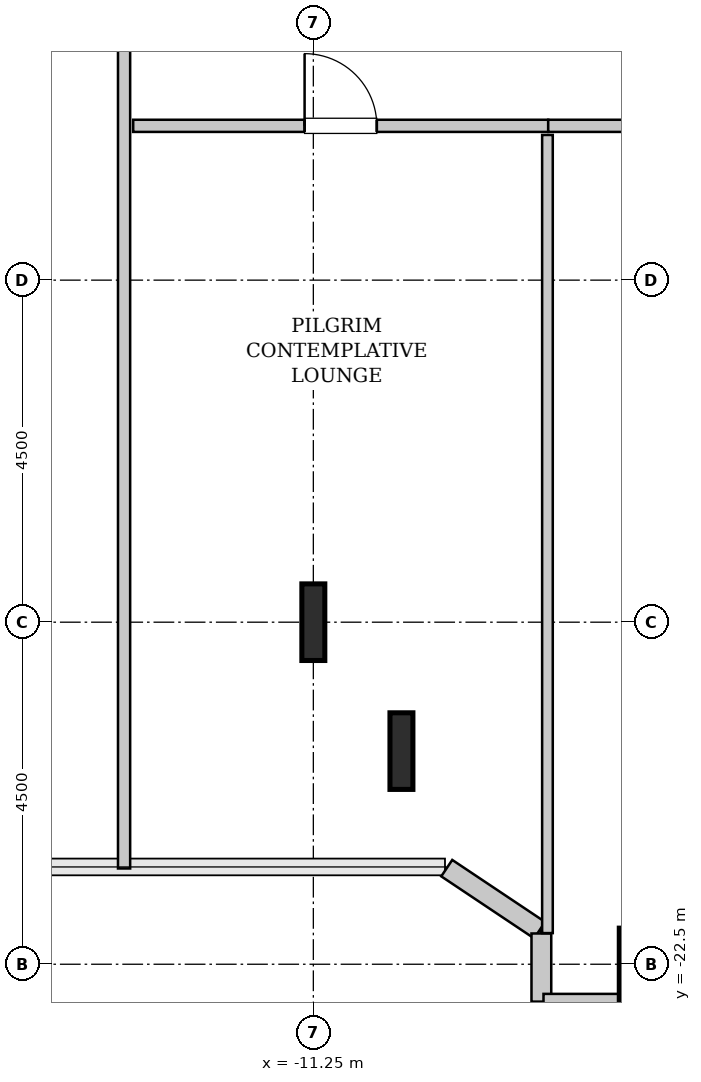
"""IFC4 building model, lengths in metres.
Left out: names, types, materials, properties, quantities, classifications, styles, units other than length and angle.
Written with IfcOpenShell. Run it as: python <this file> out.ifc"""

import sys

from ifc_helpers import new_model, si_unit, direction, frame, frame_2d, origin, origin_2d, place, context, subcontext, project, spatial, rectangle, hollow_rectangle, i_section, extrude, source, transform, mapped, element, fill, save


model = new_model("IFC4")
c1 = context("Model", 3, precision=1e-05, world=origin(), true_north=direction((0.0, 1.0)))
c2 = subcontext(c1, "Body", "Model", "MODEL_VIEW")
j1 = project(units=[si_unit("LENGTHUNIT", "METRE"), si_unit("PLANEANGLEUNIT", "RADIAN")], contexts=[c1])
p1 = place(None, origin())
s1 = spatial("IfcSite", under=j1, at=p1, CompositionType="ELEMENT")
p2 = place(p1, origin())
s2 = spatial("IfcBuilding", under=s1, at=p2, CompositionType="ELEMENT")
p3 = place(p2, frame((0.0, 0.0, 106.0)))
s3 = spatial("IfcBuildingStorey", under=s2, at=p3, CompositionType="ELEMENT", Elevation=106.0)
m1 = source(origin(), c2, "Body", "SweptSolid", [
    extrude(i_section(OverallWidth=0.302, OverallDepth=1.008, WebThickness=0.021, FlangeThickness=0.04, FilletRadius=0.03, at=origin_2d()), origin(), (0.0, 0.0, 1.0), 3.8),
])
for number, where, z_axis, x_axis in (
    (1, (-11.25, -18.0, 0.0), (0.0, 0.0, 1.0), (1.0, 0.0, 0.0)),
    (2, (-10.091, -19.696, 0.0), (0.0, 0.0, 1.0), (1.0, 0.0, 0.0)),
):
    element("IfcColumn", number, at=place(p3, frame(where, z_axis=z_axis, x_axis=x_axis)), inside=s3, PredefinedType="COLUMN", context=c2, shape_type="MappedRepresentation", body=[
        mapped(m1, transform((0.0, 0.0, 0.0), x_axis=(1.0, 0.0, 0.0), y_axis=(0.0, 1.0, 0.0), z_axis=(0.0, 0.0, 1.0), scale=1.0)),
    ])
m2 = source(origin(), c2, "Body", "SweptSolid", [
    extrude(hollow_rectangle(XDim=0.95, YDim=0.95, WallThickness=0.045, InnerFilletRadius=0.045, OuterFilletRadius=0.09, at=origin_2d()), origin(), (0.0, 0.0, 1.0), 3.8),
])
p4 = place(p3, frame((-6.75, -22.5, 0.0), z_axis=(0.0, 0.0, 1.0), x_axis=(1.0, 0.0, 0.0)))
e3 = element("IfcColumn", 3, at=p4, inside=s3, PredefinedType="COLUMN", context=c2, shape_type="MappedRepresentation", body=[
    mapped(m2, transform((0.0, 0.0, 0.0), x_axis=(1.0, 0.0, 0.0), y_axis=(0.0, 1.0, 0.0), z_axis=(0.0, 0.0, 1.0), scale=1.0)),
])
m3 = source(origin(), c2, "Body", "SweptSolid", [
    extrude(rectangle(XDim=1.469, YDim=0.26, at=frame_2d((0.734, 0.0))), origin(), (0.0, 0.0, 1.0), 3.55),
])
p5 = place(p3, frame((-9.495, -21.236, 0.0), z_axis=(0.0, 0.0, 1.0), x_axis=(0.831461760506, -0.555581983884, 0.0)))
e4 = element("IfcWall", 4, at=p5, inside=s3, PredefinedType="SOLIDWALL", context=c2, shape_type="MappedRepresentation", body=[
    mapped(m3, transform((0.0, 0.0, 0.0), x_axis=(1.0, 0.0, 0.0), y_axis=(0.0, 1.0, 0.0), z_axis=(0.0, 0.0, 1.0), scale=1.0)),
])
m4 = source(origin(), c2, "Body", "SweptSolid", [
    extrude(rectangle(XDim=0.897, YDim=0.26, at=frame_2d((0.448, 0.0))), origin(), (0.0, 0.0, 1.0), 3.55),
])
p6 = place(p3, frame((-8.25, -22.095, 0.0), z_axis=(0.0, 0.0, 1.0), x_axis=(0.0, -1.0, 0.0)))
e5 = element("IfcWall", 5, at=p6, inside=s3, PredefinedType="SOLIDWALL", context=c2, shape_type="MappedRepresentation", body=[
    mapped(m4, transform((0.0, 0.0, 0.0), x_axis=(1.0, 0.0, 0.0), y_axis=(0.0, 1.0, 0.0), z_axis=(0.0, 0.0, 1.0), scale=1.0)),
])
m5 = source(origin(), c2, "Body", "SweptSolid", [
    extrude(rectangle(XDim=1.37, YDim=0.26, at=frame_2d((0.685, 0.0))), origin(), (0.0, 0.0, 1.0), 3.55),
])
p7 = place(p3, frame((-8.222, -23.02, 0.0), z_axis=(0.0, 0.0, 1.0), x_axis=(1.0, 0.0, 0.0)))
e6 = element("IfcWall", 6, at=p7, inside=s3, PredefinedType="SOLIDWALL", context=c2, shape_type="MappedRepresentation", body=[
    mapped(m5, transform((0.0, 0.0, 0.0), x_axis=(1.0, 0.0, 0.0), y_axis=(0.0, 1.0, 0.0), z_axis=(0.0, 0.0, 1.0), scale=1.0)),
])
m6 = source(origin(), c2, "Body", "SweptSolid", [
    extrude(rectangle(XDim=18.445, YDim=0.16, at=frame_2d((9.223, 0.0))), origin(), (0.0, 0.0, 1.0), 3.535),
])
p8 = place(p3, frame((-13.74, -21.24, 0.0), z_axis=(0.0, 0.0, 1.0), x_axis=(0.0, 1.0, 0.0)))
e7 = element("IfcWall", 7, at=p8, inside=s3, PredefinedType="PARTITIONING", context=c2, shape_type="MappedRepresentation", body=[
    mapped(m6, transform((0.0, 0.0, 0.0), x_axis=(1.0, 0.0, 0.0), y_axis=(0.0, 1.0, 0.0), z_axis=(0.0, 0.0, 1.0), scale=1.0)),
])
p9 = place(p8, frame((13.613, 0.0, 0.0)))
e8 = element("IfcOpeningElement", 8, at=p9, cuts=e7, PredefinedType="OPENING", context=c2, shape_type="SweptSolid", body=[
    extrude(rectangle(XDim=0.95, YDim=2.1, at=frame_2d((0.475, 1.05))), frame((0.0, 0.09, 0.0), z_axis=(0.0, -1.0, 0.0), x_axis=(1.0, 0.0, 0.0)), (0.0, 0.0, 1.0), 0.18),
])
m7 = source(origin(), c2, "Body", "SweptSolid", [
    extrude(rectangle(XDim=5.46, YDim=0.16, at=frame_2d((2.73, 0.0))), origin(), (0.0, 0.0, 1.0), 3.535),
])
p10 = place(p3, frame((-13.62, -11.47, 0.0), z_axis=(0.0, 0.0, 1.0), x_axis=(1.0, 0.0, 0.0)))
e9 = element("IfcWall", 9, at=p10, inside=s3, PredefinedType="PARTITIONING", context=c2, shape_type="MappedRepresentation", body=[
    mapped(m7, transform((0.0, 0.0, 0.0), x_axis=(1.0, 0.0, 0.0), y_axis=(0.0, 1.0, 0.0), z_axis=(0.0, 0.0, 1.0), scale=1.0)),
])
p11 = place(p10, frame((2.255, 0.0, 0.0)))
e10 = element("IfcOpeningElement", 10, at=p11, cuts=e9, PredefinedType="OPENING", context=c2, shape_type="SweptSolid", body=[
    extrude(rectangle(XDim=0.95, YDim=2.1, at=frame_2d((0.475, 1.05))), frame((0.0, 0.09, 0.0), z_axis=(0.0, -1.0, 0.0), x_axis=(1.0, 0.0, 0.0)), (0.0, 0.0, 1.0), 0.18),
])
m8 = source(origin(), c2, "Body", "SweptSolid", [
    extrude(rectangle(XDim=10.5, YDim=0.14, at=frame_2d((5.25, 0.0))), origin(), (0.0, 0.0, 1.0), 3.535),
])
p12 = place(p3, frame((-8.17, -22.09, 0.0), z_axis=(0.0, 0.0, 1.0), x_axis=(0.0, 1.0, 0.0)))
e11 = element("IfcWall", 11, at=p12, inside=s3, PredefinedType="PARTITIONING", context=c2, shape_type="MappedRepresentation", body=[
    mapped(m8, transform((0.0, 0.0, 0.0), x_axis=(1.0, 0.0, 0.0), y_axis=(0.0, 1.0, 0.0), z_axis=(0.0, 0.0, 1.0), scale=1.0)),
])
m9 = source(origin(), c2, "Body", "SweptSolid", [
    extrude(rectangle(XDim=5.565, YDim=0.16, at=frame_2d((2.782, 0.0))), origin(), (0.0, 0.0, 1.0), 3.535),
])
p13 = place(p3, frame((-8.16, -11.47, 0.0), z_axis=(0.0, 0.0, 1.0), x_axis=(1.0, 0.0, 0.0)))
e12 = element("IfcWall", 12, at=p13, inside=s3, PredefinedType="PARTITIONING", context=c2, shape_type="MappedRepresentation", body=[
    mapped(m9, transform((0.0, 0.0, 0.0), x_axis=(1.0, 0.0, 0.0), y_axis=(0.0, 1.0, 0.0), z_axis=(0.0, 0.0, 1.0), scale=1.0)),
])
p14 = place(p13, frame((2.308, 0.0, 0.0)))
e13 = element("IfcOpeningElement", 13, at=p14, cuts=e12, PredefinedType="OPENING", context=c2, shape_type="SweptSolid", body=[
    extrude(rectangle(XDim=0.95, YDim=2.1, at=frame_2d((0.475, 1.05))), frame((0.0, 0.09, 0.0), z_axis=(0.0, -1.0, 0.0), x_axis=(1.0, 0.0, 0.0)), (0.0, 0.0, 1.0), 0.18),
])
m10 = source(origin(), c2, "Body", "SweptSolid", [
    extrude(rectangle(XDim=0.95, YDim=2.1, at=frame_2d((0.475, 1.05))), frame((0.0, 0.025, 0.0), z_axis=(0.0, -1.0, 0.0), x_axis=(1.0, 0.0, 0.0)), (0.0, 0.0, 1.0), 0.05),
])
p15 = place(p11, origin())
e14 = element("IfcDoor", 14, at=p15, inside=s3, OperationType="SINGLE_SWING_LEFT", PredefinedType="DOOR", context=c2, shape_type="MappedRepresentation", body=[
    mapped(m10, transform((0.0, 0.0, 0.0), x_axis=(1.0, 0.0, 0.0), y_axis=(0.0, 1.0, 0.0), z_axis=(0.0, 0.0, 1.0), scale=1.0)),
])
fill(e10, e14)
save(model, sys.argv[1])
